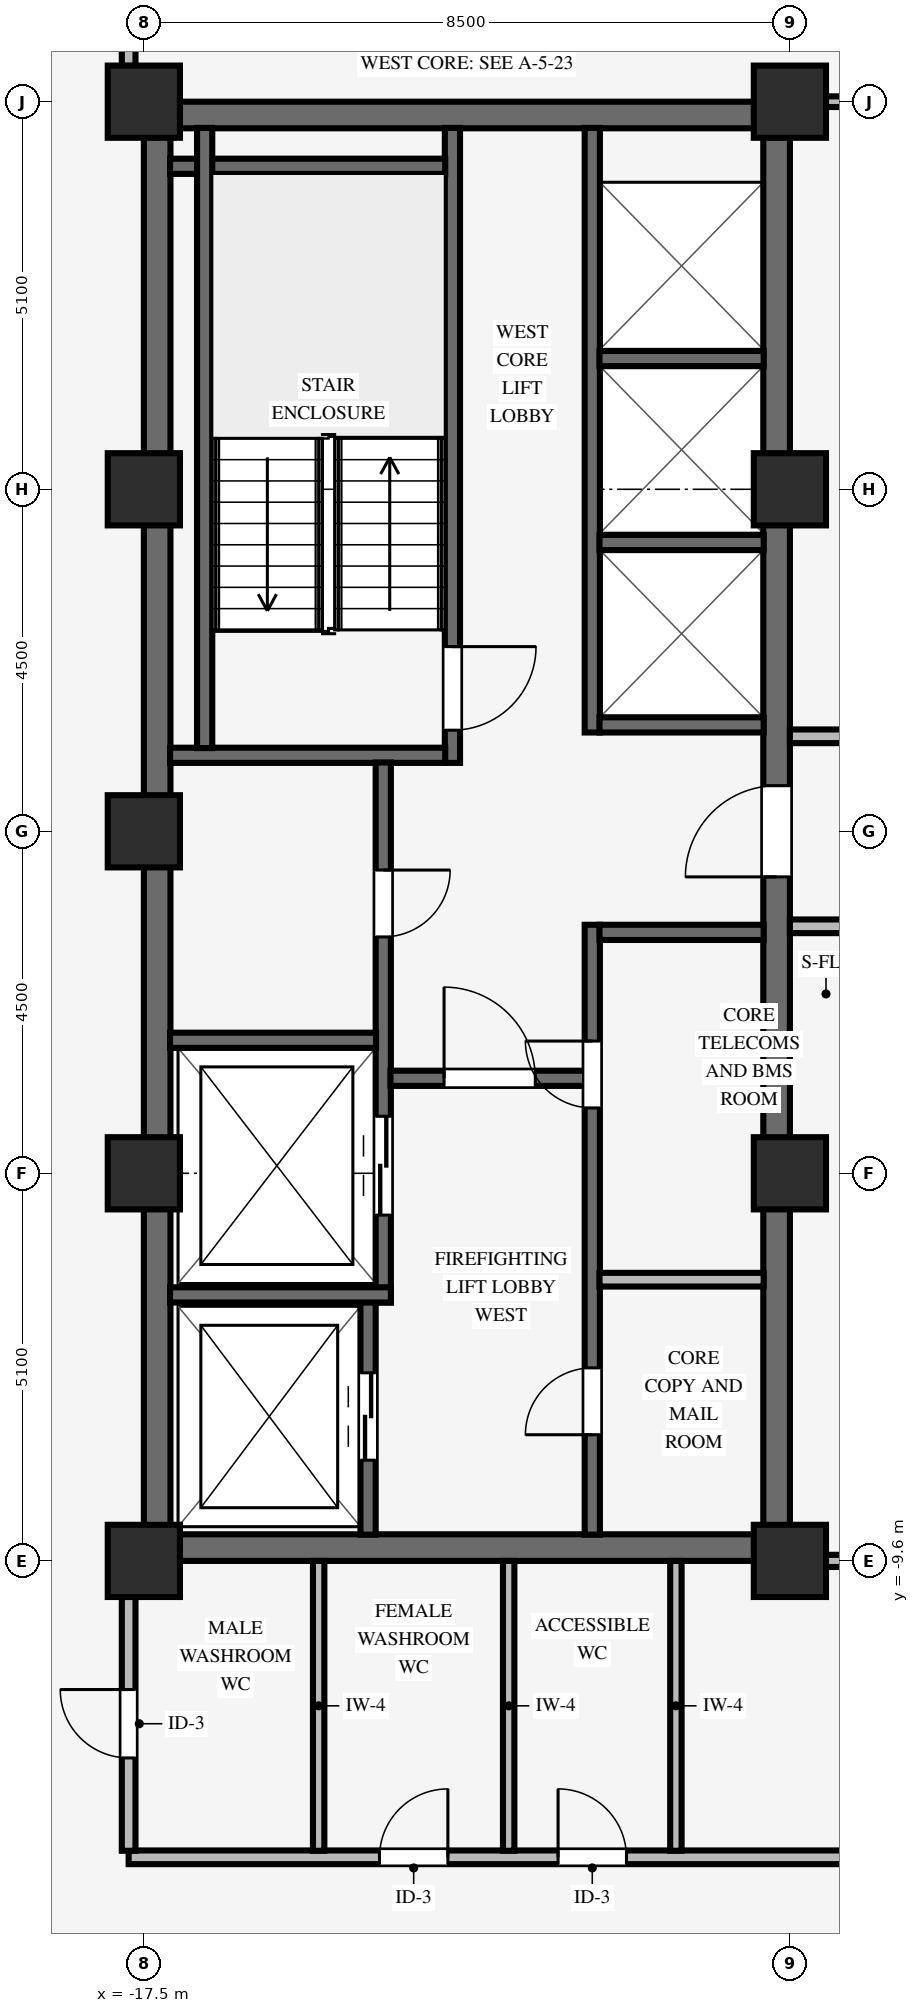
"""IFC4 building model, lengths in metres.
Left out: names, types, materials, properties, quantities, classifications, styles, units other than length and angle.
Written with IfcOpenShell. Run it as: python <this file> out.ifc"""

import sys

from ifc_helpers import new_model, si_unit, direction, frame, frame_2d, origin, origin_2d, place, context, subcontext, project, spatial, rectangle, extrude, source, transform, mapped, element, fill, save


model = new_model("IFC4")
c1 = context("Model", 3, precision=1e-05, world=origin(), true_north=direction((0.0, 1.0)))
c2 = subcontext(c1, "Body", "Model", "MODEL_VIEW")
j1 = project(units=[si_unit("LENGTHUNIT", "METRE"), si_unit("PLANEANGLEUNIT", "RADIAN")], contexts=[c1])
p1 = place(None, origin())
s1 = spatial("IfcSite", under=j1, at=p1, CompositionType="ELEMENT")
p2 = place(p1, origin())
s2 = spatial("IfcBuilding", under=s1, at=p2, CompositionType="ELEMENT")
p3 = place(p2, frame((0.0, 0.0, 201.85)))
s3 = spatial("IfcBuildingStorey", under=s2, at=p3, CompositionType="ELEMENT", Elevation=201.85)
for number, where, z_axis, x_axis in (
    (1, (-17.5, -9.425, 0.0), (0.0, 0.0, 1.0), (1.0, 0.0, 0.0)),
    (2, (-17.5, 9.425, 0.0), (0.0, 0.0, 1.0), (1.0, 0.0, 0.0)),
):
    element("IfcWall", number, at=place(p3, frame(where, z_axis=z_axis, x_axis=x_axis)), inside=s3, PredefinedType="SHEAR", context=c2, shape_type="SweptSolid", body=[
        extrude(rectangle(XDim=8.5, YDim=0.35, at=frame_2d((4.25, 0.0))), origin(), (0.0, 0.0, 1.0), 3.37),
    ])
p4 = place(p3, frame((-17.325, -9.255, 0.0), z_axis=(0.0, 0.0, 1.0), x_axis=(0.0, 1.0, 0.0)))
e3 = element("IfcWall", 3, at=p4, inside=s3, PredefinedType="SHEAR", context=c2, shape_type="SweptSolid", body=[
    extrude(rectangle(XDim=18.51, YDim=0.35, at=frame_2d((9.255, 0.0))), origin(), (0.0, 0.0, 1.0), 3.37),
])
p5 = place(p3, frame((-9.175, -9.255, 0.0), z_axis=(0.0, 0.0, 1.0), x_axis=(0.0, 1.0, 0.0)))
e4 = element("IfcWall", 4, at=p5, inside=s3, PredefinedType="SHEAR", context=c2, shape_type="SweptSolid", body=[
    extrude(rectangle(XDim=18.51, YDim=0.35, at=frame_2d((9.255, 0.0))), origin(), (0.0, 0.0, 1.0), 3.37),
])
p6 = place(p5, frame((8.655, 0.0, 0.0)))
e5 = element("IfcOpeningElement", 5, at=p6, cuts=e4, PredefinedType="OPENING", context=c2, shape_type="SweptSolid", body=[
    extrude(rectangle(XDim=1.2, YDim=2.15, at=frame_2d((0.6, 1.075))), frame((0.0, 0.185, 0.0), z_axis=(0.0, -1.0, 0.0), x_axis=(1.0, 0.0, 0.0)), (0.0, 0.0, 1.0), 0.37),
])
for number, where, z_axis, x_axis in (
    (6, (-17.5, -9.6, 0.0), (0.0, 0.0, 1.0), (1.0, 0.0, 0.0)),
    (7, (-17.5, -4.5, 0.0), (0.0, 0.0, 1.0), (1.0, 0.0, 0.0)),
    (8, (-17.5, 4.5, 0.0), (0.0, 0.0, 1.0), (1.0, 0.0, 0.0)),
    (9, (-17.5, 9.6, 0.0), (0.0, 0.0, 1.0), (1.0, 0.0, 0.0)),
    (10, (-9.0, -9.6, 0.0), (0.0, 0.0, 1.0), (1.0, 0.0, 0.0)),
    (11, (-9.0, -4.5, 0.0), (0.0, 0.0, 1.0), (1.0, 0.0, 0.0)),
    (12, (-9.0, 4.5, 0.0), (0.0, 0.0, 1.0), (1.0, 0.0, 0.0)),
    (13, (-9.0, 9.6, 0.0), (0.0, 0.0, 1.0), (1.0, 0.0, 0.0)),
    (14, (-17.5, 0.0, 0.0), (0.0, 0.0, 1.0), (1.0, 0.0, 0.0)),
):
    element("IfcColumn", number, at=place(p3, frame(where, z_axis=z_axis, x_axis=x_axis)), inside=s3, PredefinedType="COLUMN", context=c2, shape_type="SweptSolid", body=[
        extrude(rectangle(XDim=0.95, YDim=0.95, at=origin_2d()), origin(), (0.0, 0.0, 1.0), 3.37),
    ])
p7 = place(p3, frame((-13.44, 0.9, 0.0), z_axis=(0.0, 0.0, 1.0), x_axis=(0.0, 1.0, 0.0)))
e15 = element("IfcWall", 15, at=p7, inside=s3, PredefinedType="SHEAR", context=c2, shape_type="SweptSolid", body=[
    extrude(rectangle(XDim=8.355, YDim=0.2, at=frame_2d((4.177, 0.0))), origin(), (0.0, 0.0, 1.0), 3.37),
])
p8 = place(p7, frame((1.53, 0.0, 0.0), z_axis=(0.0, 0.0, 1.0), x_axis=(-1.0, 0.0, 0.0)))
e16 = element("IfcOpeningElement", 16, at=p8, cuts=e15, PredefinedType="OPENING", context=c2, shape_type="SweptSolid", body=[
    extrude(rectangle(XDim=1.1, YDim=2.15, at=frame_2d((0.55, 1.075))), frame((0.0, 0.11, 0.0), z_axis=(0.0, -1.0, 0.0), x_axis=(1.0, 0.0, 0.0)), (0.0, 0.0, 1.0), 0.22),
])
for number, where, z_axis, x_axis in (
    (17, (-17.155, 1.0, 0.0), (0.0, 0.0, 1.0), (1.0, 0.0, 0.0)),
    (18, (-17.155, 8.75, 0.0), (0.0, 0.0, 1.0), (1.0, 0.0, 0.0)),
):
    element("IfcWall", number, at=place(p3, frame(where, z_axis=z_axis, x_axis=x_axis)), inside=s3, PredefinedType="SHEAR", context=c2, shape_type="SweptSolid", body=[
        extrude(rectangle(XDim=3.62, YDim=0.2, at=frame_2d((1.81, 0.0))), origin(), (0.0, 0.0, 1.0), 3.37),
    ])
p9 = place(p3, frame((-16.7, 1.095, 0.0), z_axis=(0.0, 0.0, 1.0), x_axis=(0.0, 1.0, 0.0)))
e19 = element("IfcWall", 19, at=p9, inside=s3, PredefinedType="SHEAR", context=c2, shape_type="SweptSolid", body=[
    extrude(rectangle(XDim=8.16, YDim=0.2, at=frame_2d((4.08, 0.0))), origin(), (0.0, 0.0, 1.0), 3.37),
])
p10 = place(p3, frame((-14.55, -9.255, 0.0), z_axis=(0.0, 0.0, 1.0), x_axis=(0.0, 1.0, 0.0)))
e20 = element("IfcWall", 20, at=p10, inside=s3, PredefinedType="SHEAR", context=c2, shape_type="SweptSolid", body=[
    extrude(rectangle(XDim=3.06, YDim=0.2, at=frame_2d((1.53, 0.0))), origin(), (0.0, 0.0, 1.0), 3.37),
])
p11 = place(p10, frame((0.98, 0.0, 0.0)))
e21 = element("IfcOpeningElement", 21, at=p11, cuts=e20, PredefinedType="OPENING", context=c2, shape_type="SweptSolid", body=[
    extrude(rectangle(XDim=1.15, YDim=2.15, at=frame_2d((0.575, 1.075))), frame((0.0, 0.11, 0.0), z_axis=(0.0, -1.0, 0.0), x_axis=(1.0, 0.0, 0.0)), (0.0, 0.0, 1.0), 0.22),
])
p12 = place(p3, frame((-14.35, -6.2, 0.0), z_axis=(0.0, 0.0, 1.0), x_axis=(0.0, 1.0, 0.0)))
e22 = element("IfcWall", 22, at=p12, inside=s3, PredefinedType="SHEAR", context=c2, shape_type="SweptSolid", body=[
    extrude(rectangle(XDim=7.105, YDim=0.2, at=frame_2d((3.552, 0.0))), origin(), (0.0, 0.0, 1.0), 3.37),
])
p13 = place(p12, frame((5.69, 0.0, 0.0), z_axis=(0.0, 0.0, 1.0), x_axis=(-1.0, 0.0, 0.0)))
e23 = element("IfcOpeningElement", 23, at=p13, cuts=e22, PredefinedType="OPENING", context=c2, shape_type="SweptSolid", body=[
    extrude(rectangle(XDim=0.88, YDim=2.1, at=frame_2d((0.44, 1.05))), frame((0.0, 0.11, 0.0), z_axis=(0.0, -1.0, 0.0), x_axis=(1.0, 0.0, 0.0)), (0.0, 0.0, 1.0), 0.22),
])
p14 = place(p12, frame((1.15, 0.0, 0.0)))
e24 = element("IfcOpeningElement", 24, at=p14, cuts=e22, PredefinedType="OPENING", context=c2, shape_type="SweptSolid", body=[
    extrude(rectangle(XDim=1.3, YDim=2.2, at=frame_2d((0.65, 1.1))), frame((0.0, 0.11, 0.0), z_axis=(0.0, -1.0, 0.0), x_axis=(1.0, 0.0, 0.0)), (0.0, 0.0, 1.0), 0.22),
])
p15 = place(p3, frame((-17.155, -6.1, 0.0), z_axis=(0.0, 0.0, 1.0), x_axis=(1.0, 0.0, 0.0)))
e25 = element("IfcWall", 25, at=p15, inside=s3, PredefinedType="SHEAR", context=c2, shape_type="SweptSolid", body=[
    extrude(rectangle(XDim=2.905, YDim=0.2, at=frame_2d((1.453, 0.0))), origin(), (0.0, 0.0, 1.0), 3.37),
])
p16 = place(p3, frame((-17.155, -2.75, 0.0), z_axis=(0.0, 0.0, 1.0), x_axis=(1.0, 0.0, 0.0)))
e26 = element("IfcWall", 26, at=p16, inside=s3, PredefinedType="SHEAR", context=c2, shape_type="SweptSolid", body=[
    extrude(rectangle(XDim=2.71, YDim=0.2, at=frame_2d((1.355, 0.0))), origin(), (0.0, 0.0, 1.0), 3.37),
])
p17 = place(p3, frame((-11.6, -9.255, 0.0), z_axis=(0.0, 0.0, 1.0), x_axis=(0.0, 1.0, 0.0)))
e27 = element("IfcWall", 27, at=p17, inside=s3, PredefinedType="SHEAR", context=c2, shape_type="SweptSolid", body=[
    extrude(rectangle(XDim=8.025, YDim=0.2, at=frame_2d((4.012, 0.0))), origin(), (0.0, 0.0, 1.0), 3.37),
])
p18 = place(p17, frame((1.315, 0.0, 0.0)))
e28 = element("IfcOpeningElement", 28, at=p18, cuts=e27, PredefinedType="OPENING", context=c2, shape_type="SweptSolid", body=[
    extrude(rectangle(XDim=0.88, YDim=2.1, at=frame_2d((0.44, 1.05))), frame((0.0, 0.11, 0.0), z_axis=(0.0, -1.0, 0.0), x_axis=(1.0, 0.0, 0.0)), (0.0, 0.0, 1.0), 0.22),
])
p19 = place(p17, frame((5.615, 0.0, 0.0)))
e29 = element("IfcOpeningElement", 29, at=p19, cuts=e27, PredefinedType="OPENING", context=c2, shape_type="SweptSolid", body=[
    extrude(rectangle(XDim=0.88, YDim=2.1, at=frame_2d((0.44, 1.05))), frame((0.0, 0.11, 0.0), z_axis=(0.0, -1.0, 0.0), x_axis=(1.0, 0.0, 0.0)), (0.0, 0.0, 1.0), 0.22),
])
p20 = place(p3, frame((-14.255, -3.25, 0.0), z_axis=(0.0, 0.0, 1.0), x_axis=(1.0, 0.0, 0.0)))
e30 = element("IfcWall", 30, at=p20, inside=s3, PredefinedType="SHEAR", context=c2, shape_type="SweptSolid", body=[
    extrude(rectangle(XDim=2.56, YDim=0.2, at=frame_2d((1.28, 0.0))), origin(), (0.0, 0.0, 1.0), 3.37),
])
p21 = place(p20, frame((0.705, 0.0, 0.0)))
e31 = element("IfcOpeningElement", 31, at=p21, cuts=e30, PredefinedType="OPENING", context=c2, shape_type="SweptSolid", body=[
    extrude(rectangle(XDim=1.2, YDim=2.15, at=frame_2d((0.6, 1.075))), frame((0.0, 0.11, 0.0), z_axis=(0.0, -1.0, 0.0), x_axis=(1.0, 0.0, 0.0)), (0.0, 0.0, 1.0), 0.22),
])
p22 = place(p3, frame((-11.505, -1.33, 0.0), z_axis=(0.0, 0.0, 1.0), x_axis=(1.0, 0.0, 0.0)))
e32 = element("IfcWall", 32, at=p22, inside=s3, PredefinedType="SHEAR", context=c2, shape_type="SweptSolid", body=[
    extrude(rectangle(XDim=2.16, YDim=0.2, at=frame_2d((1.08, 0.0))), origin(), (0.0, 0.0, 1.0), 3.37),
])
p23 = place(p3, frame((-11.505, -5.9, 0.0), z_axis=(0.0, 0.0, 1.0), x_axis=(1.0, 0.0, 0.0)))
e33 = element("IfcWall", 33, at=p23, inside=s3, PredefinedType="PARTITIONING", context=c2, shape_type="SweptSolid", body=[
    extrude(rectangle(XDim=2.16, YDim=0.18, at=frame_2d((1.08, 0.0))), origin(), (0.0, 0.0, 1.0), 3.36),
])
p24 = place(p3, frame((-11.6, 1.3, 0.0), z_axis=(0.0, 0.0, 1.0), x_axis=(0.0, 1.0, 0.0)))
e34 = element("IfcWall", 34, at=p24, inside=s3, PredefinedType="SHEAR", context=c2, shape_type="SweptSolid", body=[
    extrude(rectangle(XDim=7.955, YDim=0.2, at=frame_2d((3.978, 0.0))), origin(), (0.0, 0.0, 1.0), 3.37),
])
for number, where, z_axis, x_axis in (
    (35, (-11.505, 1.4, 0.0), (0.0, 0.0, 1.0), (1.0, 0.0, 0.0)),
    (36, (-11.505, 3.8, 0.0), (0.0, 0.0, 1.0), (1.0, 0.0, 0.0)),
    (37, (-11.505, 6.22, 0.0), (0.0, 0.0, 1.0), (1.0, 0.0, 0.0)),
):
    element("IfcWall", number, at=place(p3, frame(where, z_axis=z_axis, x_axis=x_axis)), inside=s3, PredefinedType="SHEAR", context=c2, shape_type="SweptSolid", body=[
        extrude(rectangle(XDim=2.16, YDim=0.2, at=frame_2d((1.08, 0.0))), origin(), (0.0, 0.0, 1.0), 3.37),
    ])
p25 = place(p3, frame((-17.7, -13.5, 0.0), z_axis=(0.0, 0.0, 1.0), x_axis=(1.0, 0.0, 0.0)))
e38 = element("IfcWall", 38, at=p25, inside=s3, PredefinedType="PARTITIONING", context=c2, shape_type="SweptSolid", body=[
    extrude(rectangle(XDim=24.3, YDim=0.18, at=frame_2d((12.15, 0.0))), origin(), (0.0, 0.0, 1.0), 3.008),
])
p26 = place(p25, frame((18.42, 0.0, 0.0)))
e39 = element("IfcOpeningElement", 39, at=p26, cuts=e38, PredefinedType="OPENING", context=c2, shape_type="SweptSolid", body=[
    extrude(rectangle(XDim=0.96, YDim=2.1, at=frame_2d((0.48, 1.05))), frame((0.0, 0.1, 0.0), z_axis=(0.0, -1.0, 0.0), x_axis=(1.0, 0.0, 0.0)), (0.0, 0.0, 1.0), 0.2),
])
p27 = place(p25, frame((9.87, 0.0, 0.0)))
e40 = element("IfcOpeningElement", 40, at=p27, cuts=e38, PredefinedType="OPENING", context=c2, shape_type="SweptSolid", body=[
    extrude(rectangle(XDim=0.96, YDim=2.1, at=frame_2d((0.48, 1.05))), frame((0.0, 0.1, 0.0), z_axis=(0.0, -1.0, 0.0), x_axis=(1.0, 0.0, 0.0)), (0.0, 0.0, 1.0), 0.2),
])
p28 = place(p25, frame((3.3, 0.0, 0.0)))
e41 = element("IfcOpeningElement", 41, at=p28, cuts=e38, PredefinedType="OPENING", context=c2, shape_type="SweptSolid", body=[
    extrude(rectangle(XDim=0.9, YDim=2.1, at=frame_2d((0.45, 1.05))), frame((0.0, 0.1, 0.0), z_axis=(0.0, -1.0, 0.0), x_axis=(1.0, 0.0, 0.0)), (0.0, 0.0, 1.0), 0.2),
])
p29 = place(p25, frame((5.65, 0.0, 0.0)))
e42 = element("IfcOpeningElement", 42, at=p29, cuts=e38, PredefinedType="OPENING", context=c2, shape_type="SweptSolid", body=[
    extrude(rectangle(XDim=0.9, YDim=2.1, at=frame_2d((0.45, 1.05))), frame((0.0, 0.1, 0.0), z_axis=(0.0, -1.0, 0.0), x_axis=(1.0, 0.0, 0.0)), (0.0, 0.0, 1.0), 0.2),
])
p30 = place(p3, frame((-8.529, -9.6, 0.0), z_axis=(0.0, 0.0, 1.0), x_axis=(1.0, 0.0, 0.0)))
e43 = element("IfcWall", 43, at=p30, inside=s3, PredefinedType="PARTITIONING", context=c2, shape_type="SweptSolid", body=[
    extrude(rectangle(XDim=8.378, YDim=0.16, at=frame_2d((4.189, 0.0))), origin(), (0.0, 0.0, 1.0), 2.405),
])
p31 = place(p3, frame((-9.0, -1.25, 0.0), z_axis=(0.0, 0.0, 1.0), x_axis=(1.0, 0.0, 0.0)))
e44 = element("IfcWall", 44, at=p31, inside=s3, PredefinedType="PARTITIONING", context=c2, shape_type="SweptSolid", body=[
    extrude(rectangle(XDim=15.6, YDim=0.18, at=frame_2d((7.8, 0.0))), origin(), (0.0, 0.0, 1.0), 3.36),
])
p32 = place(p31, frame((3.32, 0.0, 0.0)))
e45 = element("IfcOpeningElement", 45, at=p32, cuts=e44, PredefinedType="OPENING", context=c2, shape_type="SweptSolid", body=[
    extrude(rectangle(XDim=0.96, YDim=2.1, at=frame_2d((0.48, 1.05))), frame((0.0, 0.1, 0.0), z_axis=(0.0, -1.0, 0.0), x_axis=(1.0, 0.0, 0.0)), (0.0, 0.0, 1.0), 0.2),
])
p33 = place(p3, frame((-9.0, 1.25, 0.0), z_axis=(0.0, 0.0, 1.0), x_axis=(1.0, 0.0, 0.0)))
e46 = element("IfcWall", 46, at=p33, inside=s3, PredefinedType="PARTITIONING", context=c2, shape_type="SweptSolid", body=[
    extrude(rectangle(XDim=15.6, YDim=0.18, at=frame_2d((7.8, 0.0))), origin(), (0.0, 0.0, 1.0), 3.36),
])
p34 = place(p33, frame((7.32, 0.0, 0.0)))
e47 = element("IfcOpeningElement", 47, at=p34, cuts=e46, PredefinedType="OPENING", context=c2, shape_type="SweptSolid", body=[
    extrude(rectangle(XDim=0.96, YDim=2.1, at=frame_2d((0.48, 1.05))), frame((0.0, 0.1, 0.0), z_axis=(0.0, -1.0, 0.0), x_axis=(1.0, 0.0, 0.0)), (0.0, 0.0, 1.0), 0.2),
])
p35 = place(p3, frame((-8.529, 9.6, 0.0), z_axis=(0.0, 0.0, 1.0), x_axis=(1.0, 0.0, 0.0)))
e48 = element("IfcWall", 48, at=p35, inside=s3, PredefinedType="PARTITIONING", context=c2, shape_type="SweptSolid", body=[
    extrude(rectangle(XDim=8.378, YDim=0.14, at=frame_2d((4.189, 0.0))), origin(), (0.0, 0.0, 1.0), 2.405),
])
p36 = place(p3, frame((-17.7, -13.414, 0.0), z_axis=(0.0, 0.0, 1.0), x_axis=(0.0, 1.0, 0.0)))
e49 = element("IfcWall", 49, at=p36, inside=s3, PredefinedType="PARTITIONING", context=c2, shape_type="SweptSolid", body=[
    extrude(rectangle(XDim=3.343, YDim=0.18, at=frame_2d((1.671, 0.0))), origin(), (0.0, 0.0, 1.0), 2.816),
])
p37 = place(p36, frame((1.221, 0.0, 0.0)))
e50 = element("IfcOpeningElement", 50, at=p37, cuts=e49, PredefinedType="OPENING", context=c2, shape_type="SweptSolid", body=[
    extrude(rectangle(XDim=0.9, YDim=2.1, at=frame_2d((0.45, 1.05))), frame((0.0, 0.1, 0.0), z_axis=(0.0, -1.0, 0.0), x_axis=(1.0, 0.0, 0.0)), (0.0, 0.0, 1.0), 0.2),
])
p38 = place(p3, frame((-17.7, 10.071, 0.0), z_axis=(0.0, 0.0, 1.0), x_axis=(0.0, 1.0, 0.0)))
e51 = element("IfcWall", 51, at=p38, inside=s3, PredefinedType="PARTITIONING", context=c2, shape_type="SweptSolid", body=[
    extrude(rectangle(XDim=3.343, YDim=0.18, at=frame_2d((1.671, 0.0))), origin(), (0.0, 0.0, 1.0), 2.816),
])
for number, where, z_axis, x_axis in (
    (52, (-15.2, -13.414, 0.0), (0.0, 0.0, 1.0), (0.0, 1.0, 0.0)),
    (53, (-12.7, -13.414, 0.0), (0.0, 0.0, 1.0), (0.0, 1.0, 0.0)),
    (54, (-10.5, -13.414, 0.0), (0.0, 0.0, 1.0), (0.0, 1.0, 0.0)),
):
    element("IfcWall", number, at=place(p3, frame(where, z_axis=z_axis, x_axis=x_axis)), inside=s3, PredefinedType="PARTITIONING", context=c2, shape_type="SweptSolid", body=[
        extrude(rectangle(XDim=3.814, YDim=0.15, at=frame_2d((1.907, 0.0))), origin(), (0.0, 0.0, 1.0), 3.36),
    ])
m1 = source(origin(), c2, "Body", "SweptSolid", [
    extrude(rectangle(XDim=1.1, YDim=2.15, at=frame_2d((0.55, 1.075))), frame((0.0, 0.025, 0.0), z_axis=(0.0, -1.0, 0.0), x_axis=(1.0, 0.0, 0.0)), (0.0, 0.0, 1.0), 0.05),
])
p39 = place(p8, origin())
e55 = element("IfcDoor", 55, at=p39, inside=s3, OperationType="SINGLE_SWING_LEFT", PredefinedType="DOOR", context=c2, shape_type="MappedRepresentation", body=[
    mapped(m1, transform((0.0, 0.0, 0.0), scale=1.0)),
])
fill(e16, e55)
m2 = source(origin(), c2, "Body", "SweptSolid", [
    extrude(rectangle(XDim=0.88, YDim=2.1, at=frame_2d((0.44, 1.05))), frame((0.0, 0.025, 0.0), z_axis=(0.0, -1.0, 0.0), x_axis=(1.0, 0.0, 0.0)), (0.0, 0.0, 1.0), 0.05),
])
p40 = place(p13, origin())
e56 = element("IfcDoor", 56, at=p40, inside=s3, OperationType="SINGLE_SWING_LEFT", PredefinedType="DOOR", context=c2, shape_type="MappedRepresentation", body=[
    mapped(m2, transform((0.0, 0.0, 0.0), scale=1.0)),
])
fill(e23, e56)
m3 = source(origin(), c2, "Body", "SweptSolid", [
    extrude(rectangle(XDim=1.2, YDim=2.15, at=frame_2d((0.6, 1.075))), frame((0.0, 0.025, 0.0), z_axis=(0.0, -1.0, 0.0), x_axis=(1.0, 0.0, 0.0)), (0.0, 0.0, 1.0), 0.05),
])
p41 = place(p21, origin())
e57 = element("IfcDoor", 57, at=p41, inside=s3, OperationType="SINGLE_SWING_LEFT", PredefinedType="DOOR", context=c2, shape_type="MappedRepresentation", body=[
    mapped(m3, transform((0.0, 0.0, 0.0), scale=1.0)),
])
fill(e31, e57)
p42 = place(p18, origin())
e58 = element("IfcDoor", 58, at=p42, inside=s3, OperationType="SINGLE_SWING_LEFT", PredefinedType="DOOR", context=c2, shape_type="MappedRepresentation", body=[
    mapped(m2, transform((0.0, 0.0, 0.0), scale=1.0)),
])
fill(e28, e58)
p43 = place(p19, origin())
e59 = element("IfcDoor", 59, at=p43, inside=s3, OperationType="SINGLE_SWING_RIGHT", PredefinedType="DOOR", context=c2, shape_type="MappedRepresentation", body=[
    mapped(m2, transform((0.0, 0.0, 0.0), scale=1.0)),
])
fill(e29, e59)
p44 = place(p6, origin())
e60 = element("IfcDoor", 60, at=p44, inside=s3, OperationType="SINGLE_SWING_LEFT", PredefinedType="DOOR", context=c2, shape_type="MappedRepresentation", body=[
    mapped(m3, transform((0.0, 0.0, 0.0), scale=1.0)),
])
fill(e5, e60)
m4 = source(origin(), c2, "Body", "SweptSolid", [
    extrude(rectangle(XDim=1.15, YDim=2.15, at=frame_2d((0.575, 1.075))), frame((0.0, 0.025, 0.0), z_axis=(0.0, -1.0, 0.0), x_axis=(1.0, 0.0, 0.0)), (0.0, 0.0, 1.0), 0.05),
])
p45 = place(p11, origin())
e61 = element("IfcDoor", 61, at=p45, inside=s3, OperationType="DOUBLE_DOOR_SLIDING", PredefinedType="DOOR", context=c2, shape_type="MappedRepresentation", body=[
    mapped(m4, transform((0.0, 0.0, 0.0), scale=1.0)),
])
fill(e21, e61)
m5 = source(origin(), c2, "Body", "SweptSolid", [
    extrude(rectangle(XDim=1.3, YDim=2.2, at=frame_2d((0.65, 1.1))), frame((0.0, 0.025, 0.0), z_axis=(0.0, -1.0, 0.0), x_axis=(1.0, 0.0, 0.0)), (0.0, 0.0, 1.0), 0.05),
])
p46 = place(p14, origin())
e62 = element("IfcDoor", 62, at=p46, inside=s3, OperationType="DOUBLE_DOOR_SLIDING", PredefinedType="DOOR", context=c2, shape_type="MappedRepresentation", body=[
    mapped(m5, transform((0.0, 0.0, 0.0), scale=1.0)),
])
fill(e24, e62)
m6 = source(origin(), c2, "Body", "SweptSolid", [
    extrude(rectangle(XDim=0.9, YDim=2.1, at=frame_2d((0.45, 1.05))), frame((0.0, 0.025, 0.0), z_axis=(0.0, -1.0, 0.0), x_axis=(1.0, 0.0, 0.0)), (0.0, 0.0, 1.0), 0.05),
])
p47 = place(p37, origin())
e63 = element("IfcDoor", 63, at=p47, inside=s3, OperationType="SINGLE_SWING_RIGHT", PredefinedType="DOOR", context=c2, shape_type="MappedRepresentation", body=[
    mapped(m6, transform((0.0, 0.0, 0.0), scale=1.0)),
])
fill(e50, e63)
p48 = place(p28, origin())
e64 = element("IfcDoor", 64, at=p48, inside=s3, OperationType="SINGLE_SWING_RIGHT", PredefinedType="DOOR", context=c2, shape_type="MappedRepresentation", body=[
    mapped(m6, transform((0.0, 0.0, 0.0), scale=1.0)),
])
fill(e41, e64)
p49 = place(p29, origin())
e65 = element("IfcDoor", 65, at=p49, inside=s3, OperationType="SINGLE_SWING_LEFT", PredefinedType="DOOR", context=c2, shape_type="MappedRepresentation", body=[
    mapped(m6, transform((0.0, 0.0, 0.0), scale=1.0)),
])
fill(e42, e65)
save(model, sys.argv[1])
